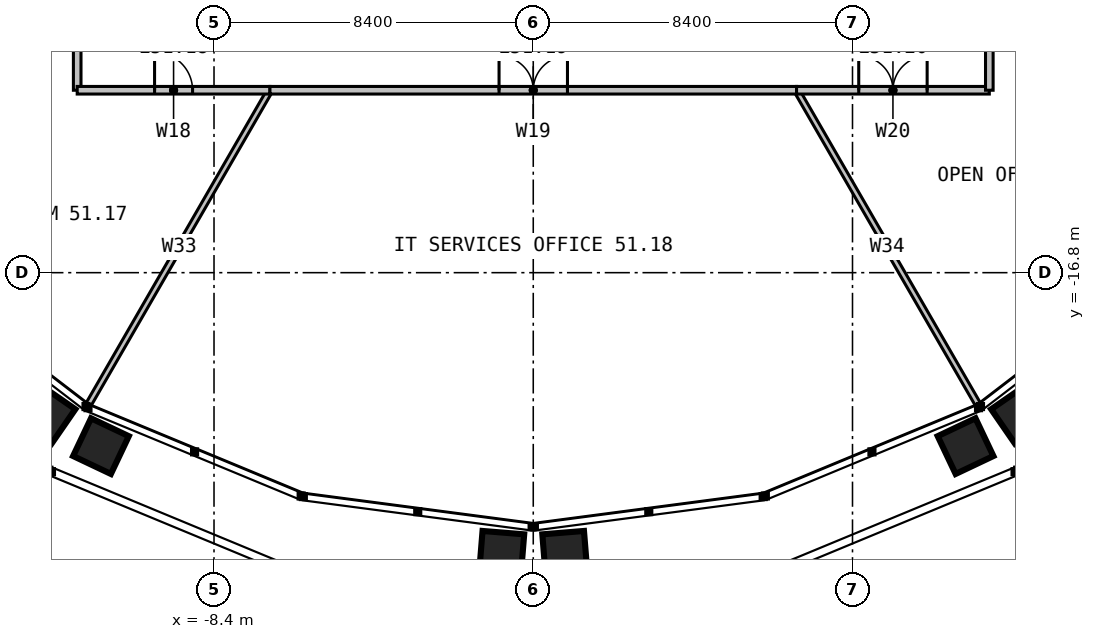
"""IFC4 building model, lengths in metres.
Left out: names, types, materials, properties, quantities, classifications, styles, units other than length and angle.
Written with IfcOpenShell. Run it as: python <this file> out.ifc"""

import sys

from ifc_helpers import new_model, si_unit, direction, frame, frame_2d, origin, place, context, subcontext, project, spatial, rectangle, extrude, element, fill, save


model = new_model("IFC4")
c1 = context("Model", 3, precision=1e-05, world=origin(), true_north=direction((0.0, 1.0)))
c2 = subcontext(c1, "Body", "Model", "MODEL_VIEW")
j1 = project(units=[si_unit("LENGTHUNIT", "METRE"), si_unit("PLANEANGLEUNIT", "RADIAN")], contexts=[c1])
p1 = place(None, origin())
s1 = spatial("IfcSite", under=j1, at=p1, CompositionType="ELEMENT")
p2 = place(p1, origin())
s2 = spatial("IfcBuilding", under=s1, at=p2, CompositionType="ELEMENT")
p3 = place(p2, frame((0.0, 0.0, 211.0)))
s3 = spatial("IfcBuildingStorey", under=s2, at=p3, CompositionType="ELEMENT", Elevation=211.0)
for number, where, z_axis, x_axis in (
    (1, (12.0, -6.928, 0.0), (0.0, 0.0, 1.0), (0.866, -0.5, 0.0)),
    (2, (-12.0, -6.928, 0.0), (0.0, 0.0, 1.0), (-0.866, -0.5, 0.0)),
):
    element("IfcWall", number, at=place(p3, frame(where, z_axis=z_axis, x_axis=x_axis)), inside=s3, PredefinedType="PARTITIONING", context=c2, shape_type="SweptSolid", body=[
        extrude(rectangle(XDim=9.541, YDim=0.15, at=frame_2d((4.771, 0.0))), origin(), (0.0, 0.0, 1.0), 2.79),
    ])
p4 = place(p3, frame((-12.0, -9.208, 0.0), z_axis=(0.0, 0.0, 1.0), x_axis=(-0.793356547797, -0.608757248883, 0.0)))
e3 = element("IfcWall", 3, at=p4, inside=s3, PredefinedType="PARTITIONING", context=c2, shape_type="SweptSolid", body=[
    extrude(rectangle(XDim=8.072, YDim=0.15, at=frame_2d((4.036, 0.0))), origin(), (0.0, 0.0, 1.0), 2.79),
])
for number, where, z_axis, x_axis in (
    (4, (-6.928, -12.0, 0.0), (0.0, 0.0, 1.0), (-0.5, -0.866, 0.0)),
    (5, (6.928, -12.0, 0.0), (0.0, 0.0, 1.0), (0.5, -0.866, 0.0)),
):
    element("IfcWall", number, at=place(p3, frame(where, z_axis=z_axis, x_axis=x_axis)), inside=s3, PredefinedType="PARTITIONING", context=c2, shape_type="SweptSolid", body=[
        extrude(rectangle(XDim=9.541, YDim=0.15, at=frame_2d((4.771, 0.0))), origin(), (0.0, 0.0, 1.0), 2.79),
    ])
p5 = place(p3, frame((-12.0, -9.208, 0.0), z_axis=(0.0, 0.0, 1.0), x_axis=(0.0, -1.0, 0.0)))
e6 = element("IfcWall", 6, at=p5, inside=s3, PredefinedType="PARTITIONING", context=c2, shape_type="SweptSolid", body=[
    extrude(rectangle(XDim=2.792, YDim=0.2, at=frame_2d((1.396, 0.0))), origin(), (0.0, 0.0, 1.0), 3.8),
])
p6 = place(p3, frame((-12.0, -12.0, 0.0), z_axis=(0.0, 0.0, 1.0), x_axis=(1.0, 0.0, 0.0)))
e7 = element("IfcWall", 7, at=p6, inside=s3, PredefinedType="PARTITIONING", context=c2, shape_type="SweptSolid", body=[
    extrude(rectangle(XDim=5.072, YDim=0.2, at=frame_2d((2.536, 0.0))), origin(), (0.0, 0.0, 1.0), 3.8),
])
p7 = place(p6, frame((2.036, 0.0, 0.0)))
e8 = element("IfcOpeningElement", 8, at=p7, cuts=e7, PredefinedType="OPENING", context=c2, shape_type="SweptSolid", body=[
    extrude(rectangle(XDim=1.0, YDim=2.2, at=frame_2d((0.5, 1.1))), frame((0.0, 0.11, 0.0), z_axis=(0.0, -1.0, 0.0), x_axis=(1.0, 0.0, 0.0)), (0.0, 0.0, 1.0), 0.22),
])
p8 = place(p3, frame((-6.928, -12.0, 0.0), z_axis=(0.0, 0.0, 1.0), x_axis=(1.0, 0.0, 0.0)))
e9 = element("IfcWall", 9, at=p8, inside=s3, PredefinedType="PARTITIONING", context=c2, shape_type="SweptSolid", body=[
    extrude(rectangle(XDim=13.856, YDim=0.2, at=frame_2d((6.928, 0.0))), origin(), (0.0, 0.0, 1.0), 3.8),
])
p9 = place(p8, frame((6.028, 0.0, 0.0)))
e10 = element("IfcOpeningElement", 10, at=p9, cuts=e9, PredefinedType="OPENING", context=c2, shape_type="SweptSolid", body=[
    extrude(rectangle(XDim=1.8, YDim=2.2, at=frame_2d((0.9, 1.1))), frame((0.0, 0.11, 0.0), z_axis=(0.0, -1.0, 0.0), x_axis=(1.0, 0.0, 0.0)), (0.0, 0.0, 1.0), 0.22),
])
p10 = place(p3, frame((6.928, -12.0, 0.0), z_axis=(0.0, 0.0, 1.0), x_axis=(1.0, 0.0, 0.0)))
e11 = element("IfcWall", 11, at=p10, inside=s3, PredefinedType="PARTITIONING", context=c2, shape_type="SweptSolid", body=[
    extrude(rectangle(XDim=5.072, YDim=0.2, at=frame_2d((2.536, 0.0))), origin(), (0.0, 0.0, 1.0), 3.8),
])
p11 = place(p10, frame((1.636, 0.0, 0.0)))
e12 = element("IfcOpeningElement", 12, at=p11, cuts=e11, PredefinedType="OPENING", context=c2, shape_type="SweptSolid", body=[
    extrude(rectangle(XDim=1.8, YDim=2.2, at=frame_2d((0.9, 1.1))), frame((0.0, 0.11, 0.0), z_axis=(0.0, -1.0, 0.0), x_axis=(1.0, 0.0, 0.0)), (0.0, 0.0, 1.0), 0.22),
])
p12 = place(p3, frame((12.0, -12.0, 0.0), z_axis=(0.0, 0.0, 1.0), x_axis=(0.0, 1.0, 0.0)))
e13 = element("IfcWall", 13, at=p12, inside=s3, PredefinedType="PARTITIONING", context=c2, shape_type="SweptSolid", body=[
    extrude(rectangle(XDim=5.072, YDim=0.2, at=frame_2d((2.536, 0.0))), origin(), (0.0, 0.0, 1.0), 3.8),
])
p13 = place(p7, origin())
e14 = element("IfcDoor", 14, at=p13, inside=s3, OperationType="SINGLE_SWING_LEFT", PredefinedType="DOOR", context=c2, shape_type="SweptSolid", body=[
    extrude(rectangle(XDim=1.0, YDim=2.2, at=frame_2d((0.5, 1.1))), frame((0.0, 0.025, 0.0), z_axis=(0.0, -1.0, 0.0), x_axis=(1.0, 0.0, 0.0)), (0.0, 0.0, 1.0), 0.05),
])
fill(e8, e14)
p14 = place(p9, origin())
e15 = element("IfcDoor", 15, at=p14, inside=s3, OperationType="DOUBLE_DOOR_SINGLE_SWING", PredefinedType="DOOR", context=c2, shape_type="SweptSolid", body=[
    extrude(rectangle(XDim=1.8, YDim=2.2, at=frame_2d((0.9, 1.1))), frame((0.0, 0.025, 0.0), z_axis=(0.0, -1.0, 0.0), x_axis=(1.0, 0.0, 0.0)), (0.0, 0.0, 1.0), 0.05),
])
fill(e10, e15)
p15 = place(p11, origin())
e16 = element("IfcDoor", 16, at=p15, inside=s3, OperationType="DOUBLE_DOOR_SINGLE_SWING", PredefinedType="DOOR", context=c2, shape_type="SweptSolid", body=[
    extrude(rectangle(XDim=1.8, YDim=2.2, at=frame_2d((0.9, 1.1))), frame((0.0, 0.025, 0.0), z_axis=(0.0, -1.0, 0.0), x_axis=(1.0, 0.0, 0.0)), (0.0, 0.0, 1.0), 0.05),
])
fill(e12, e16)
save(model, sys.argv[1])
